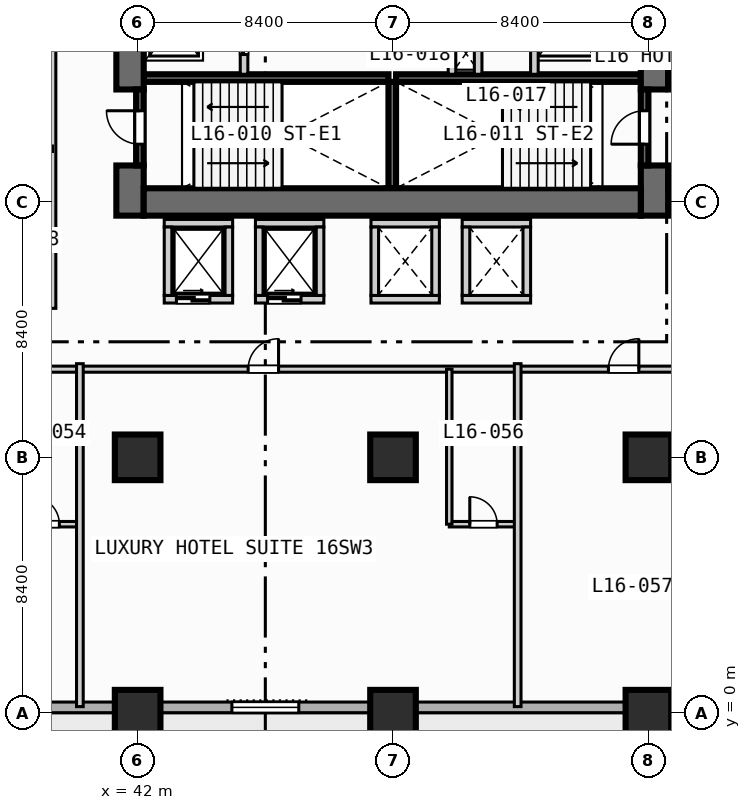
"""IFC4 building model, lengths in metres.
Left out: names, types, materials, properties, quantities, classifications, styles, units other than length and angle.
Written with IfcOpenShell. Run it as: python <this file> out.ifc"""

import sys

from ifc_helpers import new_model, si_unit, direction, frame, frame_2d, origin, origin_2d, place, context, subcontext, project, spatial, rectangle, extrude, element, fill, save


model = new_model("IFC4")
c1 = context("Model", 3, precision=1e-05, world=origin(), true_north=direction((0.0, 1.0)))
c2 = subcontext(c1, "Body", "Model", "MODEL_VIEW")
j1 = project(units=[si_unit("LENGTHUNIT", "METRE"), si_unit("PLANEANGLEUNIT", "RADIAN")], contexts=[c1])
p1 = place(None, origin())
s1 = spatial("IfcSite", under=j1, at=p1, CompositionType="ELEMENT")
p2 = place(p1, origin())
s2 = spatial("IfcBuilding", under=s1, at=p2, CompositionType="ELEMENT")
p3 = place(p2, frame((0.0, 0.0, 70.0)))
s3 = spatial("IfcBuildingStorey", under=s2, at=p3, CompositionType="ELEMENT", Elevation=70.0)
for number, where, z_axis, x_axis in (
    (1, (42.2, 20.875, 0.0), (0.0, 0.0, 1.0), (1.0, 0.0, 0.0)),
    (2, (50.5, 20.875, 0.0), (0.0, 0.0, 1.0), (1.0, 0.0, 0.0)),
):
    element("IfcWall", number, at=place(p3, frame(where, z_axis=z_axis, x_axis=x_axis)), inside=s3, PredefinedType="SOLIDWALL", context=c2, shape_type="SweptSolid", body=[
        extrude(rectangle(XDim=8.05, YDim=0.25, at=frame_2d((4.025, 0.0))), origin(), (0.0, 0.0, 1.0), 3.55),
    ])
p4 = place(p3, frame((50.375, 17.25, 0.0), z_axis=(0.0, 0.0, 1.0), x_axis=(0.0, 1.0, 0.0)))
e3 = element("IfcWall", 3, at=p4, inside=s3, PredefinedType="SOLIDWALL", context=c2, shape_type="SweptSolid", body=[
    extrude(rectangle(XDim=3.5, YDim=0.25, at=frame_2d((1.75, 0.0))), origin(), (0.0, 0.0, 1.0), 3.55),
])
p5 = place(p3, frame((41.75, 16.35, 0.0), z_axis=(0.0, 0.0, 1.0), x_axis=(0.0, 1.0, 0.0)))
e4 = element("IfcWall", 4, at=p5, inside=s3, PredefinedType="SHEAR", context=c2, shape_type="SweptSolid", body=[
    extrude(rectangle(XDim=1.65, YDim=0.9, at=frame_2d((0.825, 0.0))), origin(), (0.0, 0.0, 1.0), 3.55),
])
p6 = place(p3, frame((41.75, 20.5, 0.0), z_axis=(0.0, 0.0, 1.0), x_axis=(0.0, 1.0, 0.0)))
e5 = element("IfcWall", 5, at=p6, inside=s3, PredefinedType="SHEAR", context=c2, shape_type="SweptSolid", body=[
    extrude(rectangle(XDim=5.15, YDim=0.9, at=frame_2d((2.575, 0.0))), origin(), (0.0, 0.0, 1.0), 3.55),
])
p7 = place(p3, frame((59.0, 16.35, 0.0), z_axis=(0.0, 0.0, 1.0), x_axis=(0.0, 1.0, 0.0)))
e6 = element("IfcWall", 6, at=p7, inside=s3, PredefinedType="SHEAR", context=c2, shape_type="SweptSolid", body=[
    extrude(rectangle(XDim=1.65, YDim=0.9, at=frame_2d((0.825, 0.0))), origin(), (0.0, 0.0, 1.0), 3.55),
])
p8 = place(p3, frame((59.0, 20.5, 0.0), z_axis=(0.0, 0.0, 1.0), x_axis=(0.0, 1.0, 0.0)))
e7 = element("IfcWall", 7, at=p8, inside=s3, PredefinedType="SHEAR", context=c2, shape_type="SweptSolid", body=[
    extrude(rectangle(XDim=5.15, YDim=0.9, at=frame_2d((2.575, 0.0))), origin(), (0.0, 0.0, 1.0), 3.55),
])
p9 = place(p3, frame((42.2, 16.8, 0.0), z_axis=(0.0, 0.0, 1.0), x_axis=(1.0, 0.0, 0.0)))
e8 = element("IfcWall", 8, at=p9, inside=s3, PredefinedType="SHEAR", context=c2, shape_type="SweptSolid", body=[
    extrude(rectangle(XDim=16.35, YDim=0.9, at=frame_2d((8.175, 0.0))), origin(), (0.0, 0.0, 1.0), 3.55),
])
for number, where, z_axis, x_axis in (
    (9, (42.0, 0.0, 0.0), (0.0, 0.0, 1.0), (1.0, 0.0, 0.0)),
    (10, (42.0, 8.4, 0.0), (0.0, 0.0, 1.0), (1.0, 0.0, 0.0)),
    (11, (50.4, 0.0, 0.0), (0.0, 0.0, 1.0), (1.0, 0.0, 0.0)),
    (12, (50.4, 8.4, 0.0), (0.0, 0.0, 1.0), (1.0, 0.0, 0.0)),
    (13, (58.8, 0.0, 0.0), (0.0, 0.0, 1.0), (1.0, 0.0, 0.0)),
    (14, (58.8, 8.4, 0.0), (0.0, 0.0, 1.0), (1.0, 0.0, 0.0)),
):
    element("IfcColumn", number, at=place(p3, frame(where, z_axis=z_axis, x_axis=x_axis)), inside=s3, PredefinedType="COLUMN", context=c2, shape_type="SweptSolid", body=[
        extrude(rectangle(XDim=1.5, YDim=1.5, at=origin_2d()), origin(), (0.0, 0.0, 1.0), 3.8),
    ])
p10 = place(p3, frame((89.225, 0.175, 0.0), z_axis=(0.0, 0.0, 1.0), x_axis=(-1.0, 0.0, 0.0)))
e15 = element("IfcWall", 15, at=p10, inside=s3, PredefinedType="STANDARD", context=c2, shape_type="SweptSolid", body=[
    extrude(rectangle(XDim=86.05, YDim=0.35, at=frame_2d((43.025, 0.0))), origin(), (0.0, 0.0, 1.0), 3.55),
])
p11 = place(p10, frame((67.525, 0.0, 0.0)))
e16 = element("IfcOpeningElement", 16, at=p11, cuts=e15, PredefinedType="OPENING", context=c2, shape_type="SweptSolid", body=[
    extrude(rectangle(XDim=1.4, YDim=2.2, at=frame_2d((0.7, 1.1))), frame((0.0, 0.185, 0.0), z_axis=(0.0, -1.0, 0.0), x_axis=(1.0, 0.0, 0.0)), (0.0, 0.0, 1.0), 0.37),
])
p12 = place(p10, frame((58.725, 0.0, 0.85)))
e17 = element("IfcOpeningElement", 17, at=p12, cuts=e15, PredefinedType="OPENING", context=c2, shape_type="SweptSolid", body=[
    extrude(rectangle(XDim=2.2, YDim=1.8, at=frame_2d((1.1, 0.9))), frame((0.0, 0.185, 0.0), z_axis=(0.0, -1.0, 0.0), x_axis=(1.0, 0.0, 0.0)), (0.0, 0.0, 1.0), 0.37),
])
p13 = place(p10, frame((50.325, 0.0, 0.85)))
e18 = element("IfcOpeningElement", 18, at=p13, cuts=e15, PredefinedType="OPENING", context=c2, shape_type="SweptSolid", body=[
    extrude(rectangle(XDim=2.2, YDim=1.8, at=frame_2d((1.1, 0.9))), frame((0.0, 0.185, 0.0), z_axis=(0.0, -1.0, 0.0), x_axis=(1.0, 0.0, 0.0)), (0.0, 0.0, 1.0), 0.37),
])
p14 = place(p10, frame((41.925, 0.0, 0.85)))
e19 = element("IfcOpeningElement", 19, at=p14, cuts=e15, PredefinedType="OPENING", context=c2, shape_type="SweptSolid", body=[
    extrude(rectangle(XDim=2.2, YDim=1.8, at=frame_2d((1.1, 0.9))), frame((0.0, 0.185, 0.0), z_axis=(0.0, -1.0, 0.0), x_axis=(1.0, 0.0, 0.0)), (0.0, 0.0, 1.0), 0.37),
])
p15 = place(p10, frame((27.675, 0.0, 0.85)))
e20 = element("IfcOpeningElement", 20, at=p15, cuts=e15, PredefinedType="OPENING", context=c2, shape_type="SweptSolid", body=[
    extrude(rectangle(XDim=1.8, YDim=1.8, at=frame_2d((0.9, 0.9))), frame((0.0, 0.185, 0.0), z_axis=(0.0, -1.0, 0.0), x_axis=(1.0, 0.0, 0.0)), (0.0, 0.0, 1.0), 0.37),
])
p16 = place(p3, frame((42.075, 18.0, 0.0), z_axis=(0.0, 0.0, 1.0), x_axis=(0.0, 1.0, 0.0)))
e21 = element("IfcWall", 21, at=p16, inside=s3, PredefinedType="SOLIDWALL", context=c2, shape_type="SweptSolid", body=[
    extrude(rectangle(XDim=2.5, YDim=0.25, at=frame_2d((1.25, 0.0))), origin(), (0.0, 0.0, 1.0), 3.55),
])
p17 = place(p16, frame((0.7, 0.0, 0.0)))
e22 = element("IfcOpeningElement", 22, at=p17, cuts=e21, PredefinedType="OPENING", context=c2, shape_type="SweptSolid", body=[
    extrude(rectangle(XDim=1.1, YDim=2.15, at=frame_2d((0.55, 1.075))), frame((0.0, 0.135, 0.0), z_axis=(0.0, -1.0, 0.0), x_axis=(1.0, 0.0, 0.0)), (0.0, 0.0, 1.0), 0.27),
])
p18 = place(p3, frame((58.675, 18.0, 0.0), z_axis=(0.0, 0.0, 1.0), x_axis=(0.0, 1.0, 0.0)))
e23 = element("IfcWall", 23, at=p18, inside=s3, PredefinedType="SOLIDWALL", context=c2, shape_type="SweptSolid", body=[
    extrude(rectangle(XDim=2.5, YDim=0.25, at=frame_2d((1.25, 0.0))), origin(), (0.0, 0.0, 1.0), 3.55),
])
p19 = place(p18, frame((0.7, 0.0, 0.0)))
e24 = element("IfcOpeningElement", 24, at=p19, cuts=e23, PredefinedType="OPENING", context=c2, shape_type="SweptSolid", body=[
    extrude(rectangle(XDim=1.1, YDim=2.15, at=frame_2d((0.55, 1.075))), frame((0.0, 0.135, 0.0), z_axis=(0.0, -1.0, 0.0), x_axis=(1.0, 0.0, 0.0)), (0.0, 0.0, 1.0), 0.27),
])
p20 = place(p3, frame((45.5, 21.0, 0.0), z_axis=(0.0, 0.0, 1.0), x_axis=(0.0, 1.0, 0.0)))
e25 = element("IfcWall", 25, at=p20, inside=s3, PredefinedType="SOLIDWALL", context=c2, shape_type="SweptSolid", body=[
    extrude(rectangle(XDim=4.15, YDim=0.25, at=frame_2d((2.075, 0.0))), origin(), (0.0, 0.0, 1.0), 3.55),
])
p21 = place(p20, frame((0.65, 0.0, 0.0)))
e26 = element("IfcOpeningElement", 26, at=p21, cuts=e25, PredefinedType="OPENING", context=c2, shape_type="SweptSolid", body=[
    extrude(rectangle(XDim=1.1, YDim=2.15, at=frame_2d((0.55, 1.075))), frame((0.0, 0.135, 0.0), z_axis=(0.0, -1.0, 0.0), x_axis=(1.0, 0.0, 0.0)), (0.0, 0.0, 1.0), 0.27),
])
p22 = place(p3, frame((52.34, 21.0, 0.0), z_axis=(0.0, 0.0, 1.0), x_axis=(0.0, 1.0, 0.0)))
e27 = element("IfcWall", 27, at=p22, inside=s3, PredefinedType="SOLIDWALL", context=c2, shape_type="SweptSolid", body=[
    extrude(rectangle(XDim=3.75, YDim=0.25, at=frame_2d((1.875, 0.0))), origin(), (0.0, 0.0, 1.0), 3.55),
])
p23 = place(p3, frame((55.05, 21.0, 0.0), z_axis=(0.0, 0.0, 1.0), x_axis=(0.0, 1.0, 0.0)))
e28 = element("IfcWall", 28, at=p23, inside=s3, PredefinedType="SOLIDWALL", context=c2, shape_type="SweptSolid", body=[
    extrude(rectangle(XDim=4.15, YDim=0.25, at=frame_2d((2.075, 0.0))), origin(), (0.0, 0.0, 1.0), 3.55),
])
p24 = place(p23, frame((1.85, 0.0, 0.0)))
e29 = element("IfcOpeningElement", 29, at=p24, cuts=e28, PredefinedType="OPENING", context=c2, shape_type="SweptSolid", body=[
    extrude(rectangle(XDim=1.1, YDim=2.15, at=frame_2d((0.55, 1.075))), frame((0.0, 0.135, 0.0), z_axis=(0.0, -1.0, 0.0), x_axis=(1.0, 0.0, 0.0)), (0.0, 0.0, 1.0), 0.27),
])
p25 = place(p3, frame((53.2, 21.0, 0.0), z_axis=(0.0, 0.0, 1.0), x_axis=(0.0, 1.0, 0.0)))
e30 = element("IfcWall", 30, at=p25, inside=s3, PredefinedType="SOLIDWALL", context=c2, shape_type="SweptSolid", body=[
    extrude(rectangle(XDim=1.3, YDim=0.25, at=frame_2d((0.65, 0.0))), origin(), (0.0, 0.0, 1.0), 3.55),
])
p26 = place(p3, frame((42.875, 13.6, 0.0), z_axis=(0.0, 0.0, 1.0), x_axis=(1.0, 0.0, 0.0)))
e31 = element("IfcWall", 31, at=p26, inside=s3, PredefinedType="SOLIDWALL", context=c2, shape_type="SweptSolid", body=[
    extrude(rectangle(XDim=2.25, YDim=0.25, at=frame_2d((1.125, 0.0))), origin(), (0.0, 0.0, 1.0), 3.55),
])
p27 = place(p26, frame((0.4, 0.0, 0.0)))
e32 = element("IfcOpeningElement", 32, at=p27, cuts=e31, PredefinedType="OPENING", context=c2, shape_type="SweptSolid", body=[
    extrude(rectangle(XDim=1.1, YDim=2.15, at=frame_2d((0.55, 1.075))), frame((0.0, 0.135, 0.0), z_axis=(0.0, -1.0, 0.0), x_axis=(1.0, 0.0, 0.0)), (0.0, 0.0, 1.0), 0.27),
])
for number, where, z_axis, x_axis in (
    (33, (42.875, 16.1, 0.0), (0.0, 0.0, 1.0), (1.0, 0.0, 0.0)),
    (34, (43.0, 13.725, 0.0), (0.0, 0.0, 1.0), (0.0, 1.0, 0.0)),
    (35, (45.0, 13.725, 0.0), (0.0, 0.0, 1.0), (0.0, 1.0, 0.0)),
):
    element("IfcWall", number, at=place(p3, frame(where, z_axis=z_axis, x_axis=x_axis)), inside=s3, PredefinedType="SOLIDWALL", context=c2, shape_type="SweptSolid", body=[
        extrude(rectangle(XDim=2.25, YDim=0.25, at=frame_2d((1.125, 0.0))), origin(), (0.0, 0.0, 1.0), 3.55),
    ])
p28 = place(p3, frame((45.875, 13.6, 0.0), z_axis=(0.0, 0.0, 1.0), x_axis=(1.0, 0.0, 0.0)))
e36 = element("IfcWall", 36, at=p28, inside=s3, PredefinedType="SOLIDWALL", context=c2, shape_type="SweptSolid", body=[
    extrude(rectangle(XDim=2.25, YDim=0.25, at=frame_2d((1.125, 0.0))), origin(), (0.0, 0.0, 1.0), 3.55),
])
p29 = place(p28, frame((0.4, 0.0, 0.0)))
e37 = element("IfcOpeningElement", 37, at=p29, cuts=e36, PredefinedType="OPENING", context=c2, shape_type="SweptSolid", body=[
    extrude(rectangle(XDim=1.1, YDim=2.15, at=frame_2d((0.55, 1.075))), frame((0.0, 0.135, 0.0), z_axis=(0.0, -1.0, 0.0), x_axis=(1.0, 0.0, 0.0)), (0.0, 0.0, 1.0), 0.27),
])
for number, where, z_axis, x_axis in (
    (38, (45.875, 16.1, 0.0), (0.0, 0.0, 1.0), (1.0, 0.0, 0.0)),
    (39, (46.0, 13.725, 0.0), (0.0, 0.0, 1.0), (0.0, 1.0, 0.0)),
    (40, (48.0, 13.725, 0.0), (0.0, 0.0, 1.0), (0.0, 1.0, 0.0)),
    (41, (49.675, 13.6, 0.0), (0.0, 0.0, 1.0), (1.0, 0.0, 0.0)),
    (42, (49.675, 16.1, 0.0), (0.0, 0.0, 1.0), (1.0, 0.0, 0.0)),
    (43, (49.8, 13.725, 0.0), (0.0, 0.0, 1.0), (0.0, 1.0, 0.0)),
    (44, (51.8, 13.725, 0.0), (0.0, 0.0, 1.0), (0.0, 1.0, 0.0)),
    (45, (52.675, 13.6, 0.0), (0.0, 0.0, 1.0), (1.0, 0.0, 0.0)),
    (46, (52.675, 16.1, 0.0), (0.0, 0.0, 1.0), (1.0, 0.0, 0.0)),
    (47, (52.8, 13.725, 0.0), (0.0, 0.0, 1.0), (0.0, 1.0, 0.0)),
    (48, (54.8, 13.725, 0.0), (0.0, 0.0, 1.0), (0.0, 1.0, 0.0)),
):
    element("IfcWall", number, at=place(p3, frame(where, z_axis=z_axis, x_axis=x_axis)), inside=s3, PredefinedType="SOLIDWALL", context=c2, shape_type="SweptSolid", body=[
        extrude(rectangle(XDim=2.25, YDim=0.25, at=frame_2d((1.125, 0.0))), origin(), (0.0, 0.0, 1.0), 3.55),
    ])
p30 = place(p3, frame((25.6, 13.45, 0.0), z_axis=(0.0, 0.0, 1.0), x_axis=(1.0, 0.0, 0.0)))
e49 = element("IfcWall", 49, at=p30, inside=s3, PredefinedType="PARTITIONING", context=c2, shape_type="SweptSolid", body=[
    extrude(rectangle(XDim=13.6, YDim=0.2, at=frame_2d((6.8, 0.0))), origin(), (0.0, 0.0, 1.0), 3.55),
])
p31 = place(p30, frame((1.735, 0.0, 0.0)))
e50 = element("IfcOpeningElement", 50, at=p31, cuts=e49, PredefinedType="OPENING", context=c2, shape_type="SweptSolid", body=[
    extrude(rectangle(XDim=1.0, YDim=2.15, at=frame_2d((0.5, 1.075))), frame((0.0, 0.11, 0.0), z_axis=(0.0, -1.0, 0.0), x_axis=(1.0, 0.0, 0.0)), (0.0, 0.0, 1.0), 0.22),
])
p32 = place(p30, frame((8.535, 0.0, 0.0)))
e51 = element("IfcOpeningElement", 51, at=p32, cuts=e49, PredefinedType="OPENING", context=c2, shape_type="SweptSolid", body=[
    extrude(rectangle(XDim=1.0, YDim=2.15, at=frame_2d((0.5, 1.075))), frame((0.0, 0.11, 0.0), z_axis=(0.0, -1.0, 0.0), x_axis=(1.0, 0.0, 0.0)), (0.0, 0.0, 1.0), 0.22),
])
p33 = place(p3, frame((39.2, 13.3, 0.0), z_axis=(0.0, 0.0, 1.0), x_axis=(0.0, 1.0, 0.0)))
e52 = element("IfcWall", 52, at=p33, inside=s3, PredefinedType="PARTITIONING", context=c2, shape_type="SweptSolid", body=[
    extrude(rectangle(XDim=20.13, YDim=0.22, at=frame_2d((10.065, 0.0))), origin(), (0.0, 0.0, 1.0), 3.55),
])
p34 = place(p3, frame((36.95, 18.55, 0.0), z_axis=(0.0, 0.0, 1.0), x_axis=(1.0, 0.0, 0.0)))
e53 = element("IfcWall", 53, at=p34, inside=s3, PredefinedType="PLUMBINGWALL", context=c2, shape_type="SweptSolid", body=[
    extrude(rectangle(XDim=2.25, YDim=0.18, at=frame_2d((1.125, 0.0))), origin(), (0.0, 0.0, 1.0), 3.55),
])
p35 = place(p34, frame((0.675, 0.0, 0.0)))
e54 = element("IfcOpeningElement", 54, at=p35, cuts=e53, PredefinedType="OPENING", context=c2, shape_type="SweptSolid", body=[
    extrude(rectangle(XDim=0.9, YDim=2.1, at=frame_2d((0.45, 1.05))), frame((0.0, 0.1, 0.0), z_axis=(0.0, -1.0, 0.0), x_axis=(1.0, 0.0, 0.0)), (0.0, 0.0, 1.0), 0.2),
])
p36 = place(p3, frame((13.7, 11.3, 0.0), z_axis=(0.0, 0.0, 1.0), x_axis=(1.0, 0.0, 0.0)))
e55 = element("IfcWall", 55, at=p36, inside=s3, PredefinedType="PARTITIONING", context=c2, shape_type="SweptSolid", body=[
    extrude(rectangle(XDim=50.1, YDim=0.2, at=frame_2d((25.05, 0.0))), origin(), (0.0, 0.0, 1.0), 3.55),
])
p37 = place(p36, frame((3.61, 0.0, 0.0)))
e56 = element("IfcOpeningElement", 56, at=p37, cuts=e55, PredefinedType="OPENING", context=c2, shape_type="SweptSolid", body=[
    extrude(rectangle(XDim=1.0, YDim=2.15, at=frame_2d((0.5, 1.075))), frame((0.0, 0.11, 0.0), z_axis=(0.0, -1.0, 0.0), x_axis=(1.0, 0.0, 0.0)), (0.0, 0.0, 1.0), 0.22),
])
p38 = place(p36, frame((16.81, 0.0, 0.0)))
e57 = element("IfcOpeningElement", 57, at=p38, cuts=e55, PredefinedType="OPENING", context=c2, shape_type="SweptSolid", body=[
    extrude(rectangle(XDim=1.0, YDim=2.15, at=frame_2d((0.5, 1.075))), frame((0.0, 0.11, 0.0), z_axis=(0.0, -1.0, 0.0), x_axis=(1.0, 0.0, 0.0)), (0.0, 0.0, 1.0), 0.22),
])
p39 = place(p36, frame((31.935, 0.0, 0.0)))
e58 = element("IfcOpeningElement", 58, at=p39, cuts=e55, PredefinedType="OPENING", context=c2, shape_type="SweptSolid", body=[
    extrude(rectangle(XDim=1.0, YDim=2.15, at=frame_2d((0.5, 1.075))), frame((0.0, 0.11, 0.0), z_axis=(0.0, -1.0, 0.0), x_axis=(1.0, 0.0, 0.0)), (0.0, 0.0, 1.0), 0.22),
])
p40 = place(p36, frame((43.785, 0.0, 0.0)))
e59 = element("IfcOpeningElement", 59, at=p40, cuts=e55, PredefinedType="OPENING", context=c2, shape_type="SweptSolid", body=[
    extrude(rectangle(XDim=1.0, YDim=2.15, at=frame_2d((0.5, 1.075))), frame((0.0, 0.11, 0.0), z_axis=(0.0, -1.0, 0.0), x_axis=(1.0, 0.0, 0.0)), (0.0, 0.0, 1.0), 0.22),
])
p41 = place(p3, frame((37.85, 6.2, 0.0), z_axis=(0.0, 0.0, 1.0), x_axis=(1.0, 0.0, 0.0)))
e60 = element("IfcWall", 60, at=p41, inside=s3, PredefinedType="PLUMBINGWALL", context=c2, shape_type="SweptSolid", body=[
    extrude(rectangle(XDim=2.25, YDim=0.18, at=frame_2d((1.125, 0.0))), origin(), (0.0, 0.0, 1.0), 3.55),
])
p42 = place(p41, frame((0.675, 0.0, 0.0)))
e61 = element("IfcOpeningElement", 61, at=p42, cuts=e60, PredefinedType="OPENING", context=c2, shape_type="SweptSolid", body=[
    extrude(rectangle(XDim=0.9, YDim=2.1, at=frame_2d((0.45, 1.05))), frame((0.0, 0.1, 0.0), z_axis=(0.0, -1.0, 0.0), x_axis=(1.0, 0.0, 0.0)), (0.0, 0.0, 1.0), 0.2),
])
p43 = place(p3, frame((40.1, 0.2, 0.0), z_axis=(0.0, 0.0, 1.0), x_axis=(0.0, 1.0, 0.0)))
e62 = element("IfcWall", 62, at=p43, inside=s3, PredefinedType="PARTITIONING", context=c2, shape_type="SweptSolid", body=[
    extrude(rectangle(XDim=11.28, YDim=0.22, at=frame_2d((5.64, 0.0))), origin(), (0.0, 0.0, 1.0), 3.55),
])
p44 = place(p3, frame((52.25, 6.2, 0.0), z_axis=(0.0, 0.0, 1.0), x_axis=(1.0, 0.0, 0.0)))
e63 = element("IfcWall", 63, at=p44, inside=s3, PredefinedType="PLUMBINGWALL", context=c2, shape_type="SweptSolid", body=[
    extrude(rectangle(XDim=2.25, YDim=0.18, at=frame_2d((1.125, 0.0))), origin(), (0.0, 0.0, 1.0), 3.55),
])
p45 = place(p44, frame((0.675, 0.0, 0.0)))
e64 = element("IfcOpeningElement", 64, at=p45, cuts=e63, PredefinedType="OPENING", context=c2, shape_type="SweptSolid", body=[
    extrude(rectangle(XDim=0.9, YDim=2.1, at=frame_2d((0.45, 1.05))), frame((0.0, 0.1, 0.0), z_axis=(0.0, -1.0, 0.0), x_axis=(1.0, 0.0, 0.0)), (0.0, 0.0, 1.0), 0.2),
])
p46 = place(p3, frame((52.25, 6.2, 0.0), z_axis=(0.0, 0.0, 1.0), x_axis=(0.0, 1.0, 0.0)))
e65 = element("IfcWall", 65, at=p46, inside=s3, PredefinedType="PLUMBINGWALL", context=c2, shape_type="SweptSolid", body=[
    extrude(rectangle(XDim=5.1, YDim=0.18, at=frame_2d((2.55, 0.0))), origin(), (0.0, 0.0, 1.0), 3.55),
])
p47 = place(p3, frame((54.5, 0.2, 0.0), z_axis=(0.0, 0.0, 1.0), x_axis=(0.0, 1.0, 0.0)))
e66 = element("IfcWall", 66, at=p47, inside=s3, PredefinedType="PARTITIONING", context=c2, shape_type="SweptSolid", body=[
    extrude(rectangle(XDim=11.28, YDim=0.22, at=frame_2d((5.64, 0.0))), origin(), (0.0, 0.0, 1.0), 3.55),
])
p48 = place(p14, origin())
e67 = element("IfcWindow", 67, at=p48, inside=s3, PartitioningType="SINGLE_PANEL", PredefinedType="WINDOW", context=c2, shape_type="SweptSolid", body=[
    extrude(rectangle(XDim=2.2, YDim=1.8, at=frame_2d((1.1, 0.9))), frame((0.0, 0.03, 0.0), z_axis=(0.0, -1.0, 0.0), x_axis=(1.0, 0.0, 0.0)), (0.0, 0.0, 1.0), 0.06),
])
fill(e19, e67)
p49 = place(p17, origin())
e68 = element("IfcDoor", 68, at=p49, inside=s3, OperationType="SINGLE_SWING_RIGHT", PredefinedType="DOOR", context=c2, shape_type="SweptSolid", body=[
    extrude(rectangle(XDim=1.1, YDim=2.15, at=frame_2d((0.55, 1.075))), frame((0.0, 0.025, 0.0), z_axis=(0.0, -1.0, 0.0), x_axis=(1.0, 0.0, 0.0)), (0.0, 0.0, 1.0), 0.05),
])
fill(e22, e68)
p50 = place(p19, origin())
e69 = element("IfcDoor", 69, at=p50, inside=s3, OperationType="SINGLE_SWING_LEFT", PredefinedType="DOOR", context=c2, shape_type="SweptSolid", body=[
    extrude(rectangle(XDim=1.1, YDim=2.15, at=frame_2d((0.55, 1.075))), frame((0.0, 0.025, 0.0), z_axis=(0.0, -1.0, 0.0), x_axis=(1.0, 0.0, 0.0)), (0.0, 0.0, 1.0), 0.05),
])
fill(e24, e69)
p51 = place(p21, origin())
e70 = element("IfcDoor", 70, at=p51, inside=s3, OperationType="SLIDING_TO_LEFT", PredefinedType="DOOR", context=c2, shape_type="SweptSolid", body=[
    extrude(rectangle(XDim=1.1, YDim=2.15, at=frame_2d((0.55, 1.075))), frame((0.0, 0.025, 0.0), z_axis=(0.0, -1.0, 0.0), x_axis=(1.0, 0.0, 0.0)), (0.0, 0.0, 1.0), 0.05),
])
fill(e26, e70)
p52 = place(p27, origin())
e71 = element("IfcDoor", 71, at=p52, inside=s3, OperationType="SLIDING_TO_LEFT", PredefinedType="DOOR", context=c2, shape_type="SweptSolid", body=[
    extrude(rectangle(XDim=1.1, YDim=2.15, at=frame_2d((0.55, 1.075))), frame((0.0, 0.025, 0.0), z_axis=(0.0, -1.0, 0.0), x_axis=(1.0, 0.0, 0.0)), (0.0, 0.0, 1.0), 0.05),
])
fill(e32, e71)
p53 = place(p29, origin())
e72 = element("IfcDoor", 72, at=p53, inside=s3, OperationType="SLIDING_TO_LEFT", PredefinedType="DOOR", context=c2, shape_type="SweptSolid", body=[
    extrude(rectangle(XDim=1.1, YDim=2.15, at=frame_2d((0.55, 1.075))), frame((0.0, 0.025, 0.0), z_axis=(0.0, -1.0, 0.0), x_axis=(1.0, 0.0, 0.0)), (0.0, 0.0, 1.0), 0.05),
])
fill(e37, e72)
p54 = place(p39, origin())
e73 = element("IfcDoor", 73, at=p54, inside=s3, OperationType="SINGLE_SWING_RIGHT", PredefinedType="DOOR", context=c2, shape_type="SweptSolid", body=[
    extrude(rectangle(XDim=1.0, YDim=2.15, at=frame_2d((0.5, 1.075))), frame((0.0, 0.025, 0.0), z_axis=(0.0, -1.0, 0.0), x_axis=(1.0, 0.0, 0.0)), (0.0, 0.0, 1.0), 0.05),
])
fill(e58, e73)
p55 = place(p40, origin())
e74 = element("IfcDoor", 74, at=p55, inside=s3, OperationType="SINGLE_SWING_RIGHT", PredefinedType="DOOR", context=c2, shape_type="SweptSolid", body=[
    extrude(rectangle(XDim=1.0, YDim=2.15, at=frame_2d((0.5, 1.075))), frame((0.0, 0.025, 0.0), z_axis=(0.0, -1.0, 0.0), x_axis=(1.0, 0.0, 0.0)), (0.0, 0.0, 1.0), 0.05),
])
fill(e59, e74)
p56 = place(p42, origin())
e75 = element("IfcDoor", 75, at=p56, inside=s3, OperationType="SINGLE_SWING_LEFT", PredefinedType="DOOR", context=c2, shape_type="SweptSolid", body=[
    extrude(rectangle(XDim=0.9, YDim=2.1, at=frame_2d((0.45, 1.05))), frame((0.0, 0.025, 0.0), z_axis=(0.0, -1.0, 0.0), x_axis=(1.0, 0.0, 0.0)), (0.0, 0.0, 1.0), 0.05),
])
fill(e61, e75)
p57 = place(p45, origin())
e76 = element("IfcDoor", 76, at=p57, inside=s3, OperationType="SINGLE_SWING_LEFT", PredefinedType="DOOR", context=c2, shape_type="SweptSolid", body=[
    extrude(rectangle(XDim=0.9, YDim=2.1, at=frame_2d((0.45, 1.05))), frame((0.0, 0.025, 0.0), z_axis=(0.0, -1.0, 0.0), x_axis=(1.0, 0.0, 0.0)), (0.0, 0.0, 1.0), 0.05),
])
fill(e64, e76)
save(model, sys.argv[1])
